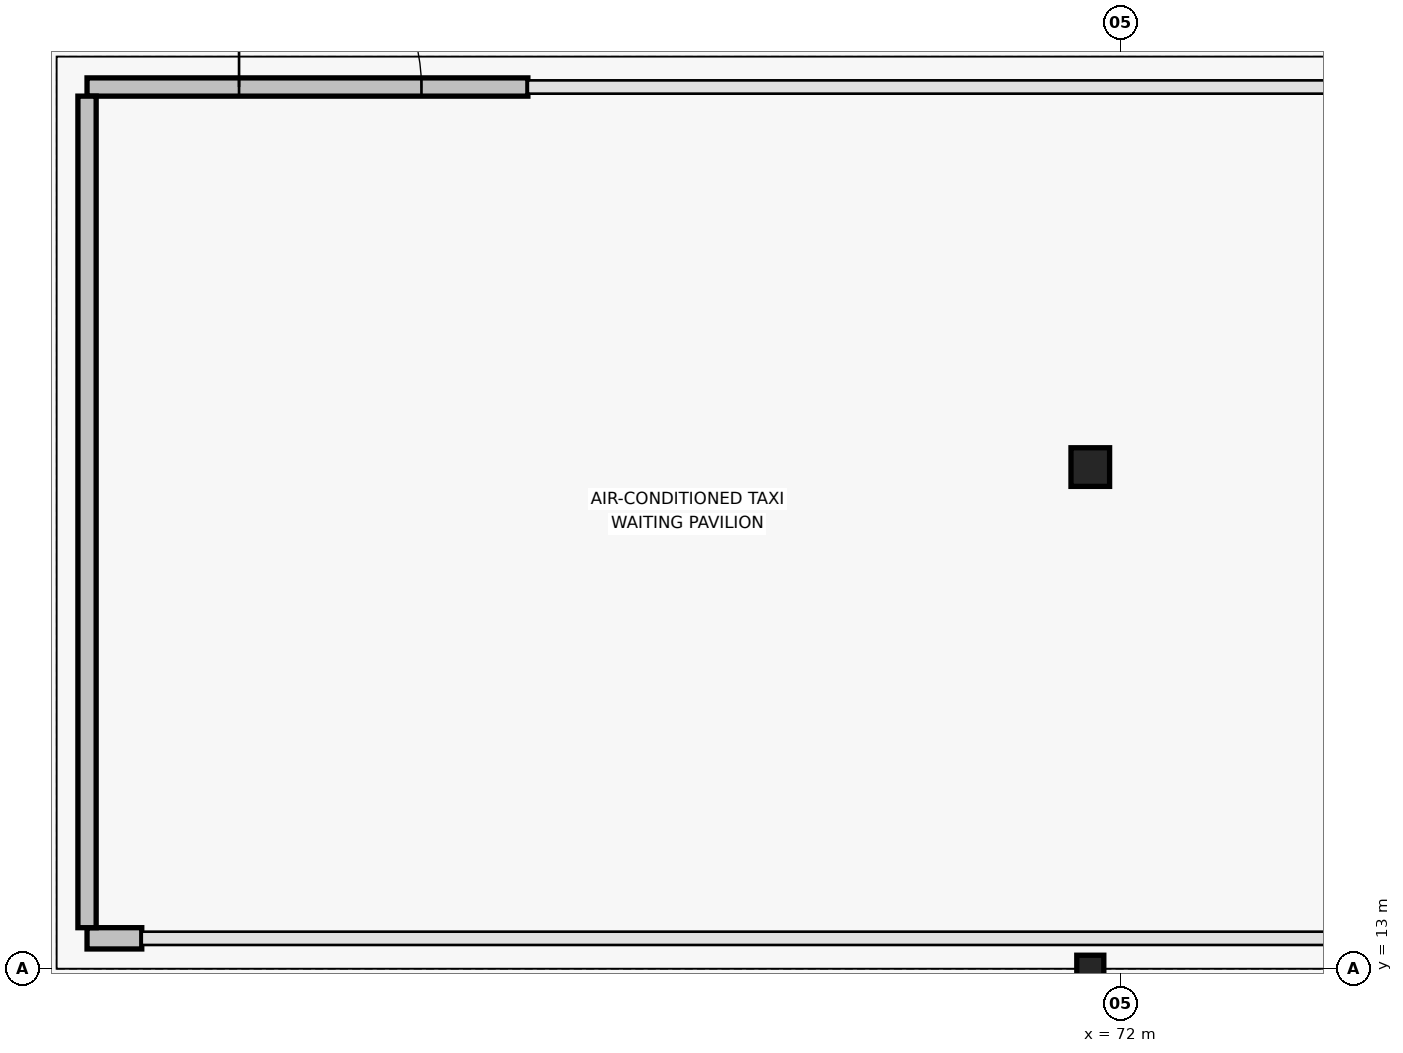
"""IFC4 building model, lengths in metres.
Left out: names, types, materials, properties, quantities, classifications, styles, units other than length and angle.
Written with IfcOpenShell. Run it as: python <this file> out.ifc"""

import sys

from ifc_helpers import new_model, si_unit, direction, frame, frame_2d, origin, origin_2d, place, context, subcontext, project, spatial, rectangle, hollow_circle, extrude, element, fill, save


model = new_model("IFC4")
c1 = context("Model", 3, precision=1e-05, world=origin(), true_north=direction((0.0, 1.0)))
c2 = subcontext(c1, "Body", "Model", "MODEL_VIEW")
j1 = project(units=[si_unit("LENGTHUNIT", "METRE"), si_unit("PLANEANGLEUNIT", "RADIAN")], contexts=[c1])
p1 = place(None, origin())
s1 = spatial("IfcSite", under=j1, at=p1, CompositionType="ELEMENT")
p2 = place(p1, origin())
s2 = spatial("IfcBuilding", under=s1, at=p2, CompositionType="ELEMENT")
p3 = place(p2, origin())
s3 = spatial("IfcBuildingStorey", under=s2, at=p3, CompositionType="ELEMENT", Elevation=0.0)
p4 = place(p3, frame((71.6, 13.0, -0.95), z_axis=(0.0, 0.0, 1.0), x_axis=(1.0, 0.0, 0.0)))
e1 = element("IfcColumn", 1, at=p4, inside=s3, PredefinedType="PILASTER", context=c2, shape_type="SweptSolid", body=[
    extrude(hollow_circle(Radius=0.178, WallThickness=0.012, at=origin_2d()), origin(), (0.0, 0.0, 1.0), 11.65),
])
p5 = place(p3, frame((71.6, 19.6, -0.95), z_axis=(0.0, 0.0, 1.0), x_axis=(1.0, 0.0, 0.0)))
e2 = element("IfcColumn", 2, at=p5, inside=s3, PredefinedType="COLUMN", context=c2, shape_type="SweptSolid", body=[
    extrude(hollow_circle(Radius=0.254, WallThickness=0.016, at=origin_2d()), origin(), (0.0, 0.0, 1.0), 10.4),
])
p6 = place(p3, frame((58.4, 24.6, 0.0), z_axis=(0.0, 0.0, 1.0), x_axis=(1.0, 0.0, 0.0)))
e3 = element("IfcWall", 3, at=p6, inside=s3, PredefinedType="STANDARD", context=c2, shape_type="SweptSolid", body=[
    extrude(rectangle(XDim=5.8, YDim=0.24, at=frame_2d((2.9, 0.0))), origin(), (0.0, 0.0, 1.0), 4.2),
])
p7 = place(p6, frame((2.0, 0.0, 0.0)))
e4 = element("IfcOpeningElement", 4, at=p7, cuts=e3, PredefinedType="OPENING", context=c2, shape_type="SweptSolid", body=[
    extrude(rectangle(XDim=2.4, YDim=2.4, at=frame_2d((1.2, 1.2))), frame((0.0, 0.13, 0.0), z_axis=(0.0, -1.0, 0.0), x_axis=(1.0, 0.0, 0.0)), (0.0, 0.0, 1.0), 0.26),
])
p8 = place(p3, frame((58.4, 13.4, 0.0), z_axis=(0.0, 0.0, 1.0), x_axis=(1.0, 0.0, 0.0)))
e5 = element("IfcWall", 5, at=p8, inside=s3, PredefinedType="STANDARD", context=c2, shape_type="SweptSolid", body=[
    extrude(rectangle(XDim=0.72, YDim=0.28, at=frame_2d((0.36, 0.0))), origin(), (0.0, 0.0, 1.0), 4.2),
])
p9 = place(p3, frame((58.4, 13.54, 0.0), z_axis=(0.0, 0.0, 1.0), x_axis=(0.0, 1.0, 0.0)))
e6 = element("IfcWall", 6, at=p9, inside=s3, PredefinedType="STANDARD", context=c2, shape_type="SweptSolid", body=[
    extrude(rectangle(XDim=10.94, YDim=0.24, at=frame_2d((5.47, 0.0))), origin(), (0.0, 0.0, 1.0), 4.2),
])
p10 = place(p7, origin())
e7 = element("IfcDoor", 7, at=p10, inside=s3, OperationType="SINGLE_SWING_LEFT", PredefinedType="DOOR", context=c2, shape_type="SweptSolid", body=[
    extrude(rectangle(XDim=2.4, YDim=2.4, at=frame_2d((1.2, 1.2))), frame((0.0, 0.025, 0.0), z_axis=(0.0, -1.0, 0.0), x_axis=(1.0, 0.0, 0.0)), (0.0, 0.0, 1.0), 0.05),
])
fill(e4, e7)
save(model, sys.argv[1])
